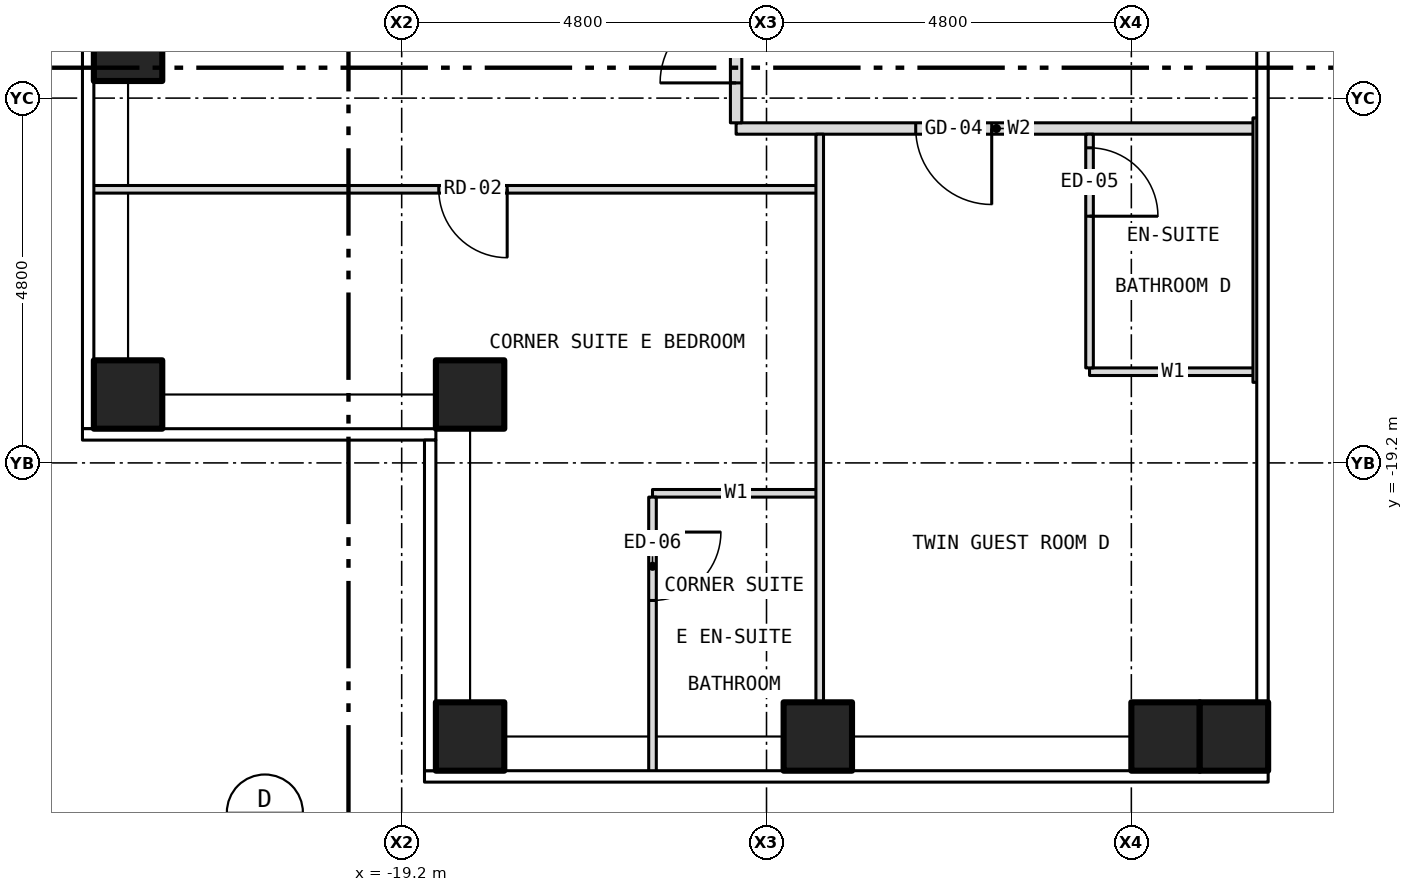
"""IFC4 building model, lengths in metres.
Left out: names, types, materials, properties, quantities, classifications, styles, units other than length and angle.
Written with IfcOpenShell. Run it as: python <this file> out.ifc"""

import sys

from ifc_helpers import new_model, si_unit, direction, frame, frame_2d, origin, origin_2d, place, context, subcontext, project, spatial, rectangle, hollow_rectangle, extrude, element, fill, save


model = new_model("IFC4")
c1 = context("Model", 3, precision=1e-05, world=origin(), true_north=direction((0.0, 1.0)))
c2 = subcontext(c1, "Body", "Model", "MODEL_VIEW")
j1 = project(units=[si_unit("LENGTHUNIT", "METRE"), si_unit("PLANEANGLEUNIT", "RADIAN")], contexts=[c1])
p1 = place(None, origin())
s1 = spatial("IfcSite", under=j1, at=p1, CompositionType="ELEMENT")
p2 = place(p1, origin())
s2 = spatial("IfcBuilding", under=s1, at=p2, CompositionType="ELEMENT")
p3 = place(p2, frame((0.0, 0.0, 124.0)))
s3 = spatial("IfcBuildingStorey", under=s2, at=p3, CompositionType="ELEMENT", Elevation=124.0)
for number, where, z_axis, x_axis in (
    (1, (-18.3, -22.8, -0.15), (0.0, 0.0, 1.0), (1.0, 0.0, 0.0)),
    (2, (-13.725, -22.8, -0.15), (0.0, 0.0, 1.0), (1.0, 0.0, 0.0)),
    (3, (-9.15, -22.8, -0.15), (0.0, 0.0, 1.0), (1.0, 0.0, 0.0)),
    (4, (-22.8, -18.3, -0.15), (0.0, 0.0, 1.0), (1.0, 0.0, 0.0)),
    (5, (-22.8, -13.725, -0.15), (0.0, 0.0, 1.0), (1.0, 0.0, 0.0)),
    (6, (-18.3, -18.3, -0.15), (0.0, 0.0, 1.0), (1.0, 0.0, 0.0)),
    (7, (-8.25, -22.8, -0.15), (0.0, 0.0, 1.0), (1.0, 0.0, 0.0)),
):
    element("IfcColumn", number, at=place(p3, frame(where, z_axis=z_axis, x_axis=x_axis)), inside=s3, PredefinedType="COLUMN", context=c2, shape_type="SweptSolid", body=[
        extrude(hollow_rectangle(XDim=0.9, YDim=0.9, WallThickness=0.05, at=origin_2d()), origin(), (0.0, 0.0, 1.0), 3.5),
    ])
for number, where, z_axis, x_axis in (
    (8, (-15.9, -19.6, 0.0), (0.0, 0.0, 1.0), (1.0, 0.0, 0.0)),
    (9, (-10.15, -18.0, 0.0), (0.0, 0.0, 1.0), (1.0, 0.0, 0.0)),
):
    element("IfcWall", number, at=place(p3, frame(where, z_axis=z_axis, x_axis=x_axis)), inside=s3, PredefinedType="PARTITIONING", context=c2, shape_type="SweptSolid", body=[
        extrude(rectangle(XDim=2.2, YDim=0.1, at=frame_2d((1.1, 0.0))), origin(), (0.0, 0.0, 1.0), 3.35),
    ])
p4 = place(p3, frame((-23.28, -15.6, 0.0), z_axis=(0.0, 0.0, 1.0), x_axis=(1.0, 0.0, 0.0)))
e10 = element("IfcWall", 10, at=p4, inside=s3, PredefinedType="PARTITIONING", context=c2, shape_type="SweptSolid", body=[
    extrude(rectangle(XDim=9.58, YDim=0.1, at=frame_2d((4.79, 0.0))), origin(), (0.0, 0.0, 1.0), 3.35),
])
p5 = place(p4, frame((4.568, 0.0, 0.0)))
e11 = element("IfcOpeningElement", 11, at=p5, cuts=e10, PredefinedType="OPENING", context=c2, shape_type="SweptSolid", body=[
    extrude(rectangle(XDim=0.9, YDim=2.1, at=frame_2d((0.45, 1.05))), frame((0.0, 0.062, 0.0), z_axis=(0.0, -1.0, 0.0), x_axis=(1.0, 0.0, 0.0)), (0.0, 0.0, 1.0), 0.124),
])
p6 = place(p3, frame((-14.8, -14.8, 0.0), z_axis=(0.0, 0.0, 1.0), x_axis=(1.0, 0.0, 0.0)))
e12 = element("IfcWall", 12, at=p6, inside=s3, PredefinedType="PARTITIONING", context=c2, shape_type="SweptSolid", body=[
    extrude(rectangle(XDim=6.85, YDim=0.15, at=frame_2d((3.425, 0.0))), origin(), (0.0, 0.0, 1.0), 3.35),
])
p7 = place(p6, frame((2.363, 0.0, 0.0)))
e13 = element("IfcOpeningElement", 13, at=p7, cuts=e12, PredefinedType="OPENING", context=c2, shape_type="SweptSolid", body=[
    extrude(rectangle(XDim=1.0, YDim=2.1, at=frame_2d((0.5, 1.05))), frame((0.0, 0.087, 0.0), z_axis=(0.0, -1.0, 0.0), x_axis=(1.0, 0.0, 0.0)), (0.0, 0.0, 1.0), 0.174),
])
p8 = place(p3, frame((-15.9, -23.28, 0.0), z_axis=(0.0, 0.0, 1.0), x_axis=(0.0, 1.0, 0.0)))
e14 = element("IfcWall", 14, at=p8, inside=s3, PredefinedType="PARTITIONING", context=c2, shape_type="SweptSolid", body=[
    extrude(rectangle(XDim=3.63, YDim=0.1, at=frame_2d((1.815, 0.0))), origin(), (0.0, 0.0, 1.0), 3.35),
])
p9 = place(p8, frame((2.27, 0.0, 0.0)))
e15 = element("IfcOpeningElement", 15, at=p9, cuts=e14, PredefinedType="OPENING", context=c2, shape_type="SweptSolid", body=[
    extrude(rectangle(XDim=0.9, YDim=2.1, at=frame_2d((0.45, 1.05))), frame((0.0, 0.062, 0.0), z_axis=(0.0, -1.0, 0.0), x_axis=(1.0, 0.0, 0.0)), (0.0, 0.0, 1.0), 0.124),
])
p10 = place(p3, frame((-14.8, -14.725, 0.0), z_axis=(0.0, 0.0, 1.0), x_axis=(0.0, 1.0, 0.0)))
e16 = element("IfcWall", 16, at=p10, inside=s3, PredefinedType="PARTITIONING", context=c2, shape_type="SweptSolid", body=[
    extrude(rectangle(XDim=3.85, YDim=0.15, at=frame_2d((1.925, 0.0))), origin(), (0.0, 0.0, 1.0), 3.35),
])
p11 = place(p10, frame((0.525, 0.0, 0.0)))
e17 = element("IfcOpeningElement", 17, at=p11, cuts=e16, PredefinedType="OPENING", context=c2, shape_type="SweptSolid", body=[
    extrude(rectangle(XDim=1.0, YDim=2.1, at=frame_2d((0.5, 1.05))), frame((0.0, 0.087, 0.0), z_axis=(0.0, -1.0, 0.0), x_axis=(1.0, 0.0, 0.0)), (0.0, 0.0, 1.0), 0.174),
])
p12 = place(p3, frame((-13.7, -22.68, 0.0), z_axis=(0.0, 0.0, 1.0), x_axis=(0.0, 1.0, 0.0)))
e18 = element("IfcWall", 18, at=p12, inside=s3, PredefinedType="PARTITIONING", context=c2, shape_type="SweptSolid", body=[
    extrude(rectangle(XDim=7.805, YDim=0.1, at=frame_2d((3.902, 0.0))), origin(), (0.0, 0.0, 1.0), 3.35),
])
p13 = place(p3, frame((-10.15, -17.95, 0.0), z_axis=(0.0, 0.0, 1.0), x_axis=(0.0, 1.0, 0.0)))
e19 = element("IfcWall", 19, at=p13, inside=s3, PredefinedType="PARTITIONING", context=c2, shape_type="SweptSolid", body=[
    extrude(rectangle(XDim=3.075, YDim=0.1, at=frame_2d((1.538, 0.0))), origin(), (0.0, 0.0, 1.0), 3.35),
])
p14 = place(p13, frame((1.996, 0.0, 0.0)))
e20 = element("IfcOpeningElement", 20, at=p14, cuts=e19, PredefinedType="OPENING", context=c2, shape_type="SweptSolid", body=[
    extrude(rectangle(XDim=0.9, YDim=2.1, at=frame_2d((0.45, 1.05))), frame((0.0, 0.062, 0.0), z_axis=(0.0, -1.0, 0.0), x_axis=(1.0, 0.0, 0.0)), (0.0, 0.0, 1.0), 0.124),
])
p15 = place(p3, frame((-7.95, -18.14, 0.0), z_axis=(0.0, 0.0, 1.0), x_axis=(0.0, 1.0, 0.0)))
e21 = element("IfcWall", 21, at=p15, inside=s3, PredefinedType="PARTITIONING", context=c2, shape_type="SweptSolid", body=[
    extrude(rectangle(XDim=3.48, YDim=0.1, at=frame_2d((1.74, 0.0))), origin(), (0.0, 0.0, 1.0), 2.733),
])
p16 = place(p7, origin())
e22 = element("IfcDoor", 22, at=p16, inside=s3, OperationType="SINGLE_SWING_RIGHT", PredefinedType="DOOR", context=c2, shape_type="SweptSolid", body=[
    extrude(rectangle(XDim=1.0, YDim=2.1, at=frame_2d((0.5, 1.05))), frame((0.0, 0.025, 0.0), z_axis=(0.0, -1.0, 0.0), x_axis=(1.0, 0.0, 0.0)), (0.0, 0.0, 1.0), 0.05),
])
fill(e13, e22)
p17 = place(p14, origin())
e23 = element("IfcDoor", 23, at=p17, inside=s3, OperationType="SINGLE_SWING_LEFT", PredefinedType="DOOR", context=c2, shape_type="SweptSolid", body=[
    extrude(rectangle(XDim=0.9, YDim=2.1, at=frame_2d((0.45, 1.05))), frame((0.0, 0.025, 0.0), z_axis=(0.0, -1.0, 0.0), x_axis=(1.0, 0.0, 0.0)), (0.0, 0.0, 1.0), 0.05),
])
fill(e20, e23)
p18 = place(p11, origin())
e24 = element("IfcDoor", 24, at=p18, inside=s3, OperationType="SINGLE_SWING_LEFT", PredefinedType="DOOR", context=c2, shape_type="SweptSolid", body=[
    extrude(rectangle(XDim=1.0, YDim=2.1, at=frame_2d((0.5, 1.05))), frame((0.0, 0.025, 0.0), z_axis=(0.0, -1.0, 0.0), x_axis=(1.0, 0.0, 0.0)), (0.0, 0.0, 1.0), 0.05),
])
fill(e17, e24)
p19 = place(p5, origin())
e25 = element("IfcDoor", 25, at=p19, inside=s3, OperationType="SINGLE_SWING_RIGHT", PredefinedType="DOOR", context=c2, shape_type="SweptSolid", body=[
    extrude(rectangle(XDim=0.9, YDim=2.1, at=frame_2d((0.45, 1.05))), frame((0.0, 0.025, 0.0), z_axis=(0.0, -1.0, 0.0), x_axis=(1.0, 0.0, 0.0)), (0.0, 0.0, 1.0), 0.05),
])
fill(e11, e25)
p20 = place(p9, origin())
e26 = element("IfcDoor", 26, at=p20, inside=s3, OperationType="SINGLE_SWING_RIGHT", PredefinedType="DOOR", context=c2, shape_type="SweptSolid", body=[
    extrude(rectangle(XDim=0.9, YDim=2.1, at=frame_2d((0.45, 1.05))), frame((0.0, 0.025, 0.0), z_axis=(0.0, -1.0, 0.0), x_axis=(1.0, 0.0, 0.0)), (0.0, 0.0, 1.0), 0.05),
])
fill(e15, e26)
save(model, sys.argv[1])
